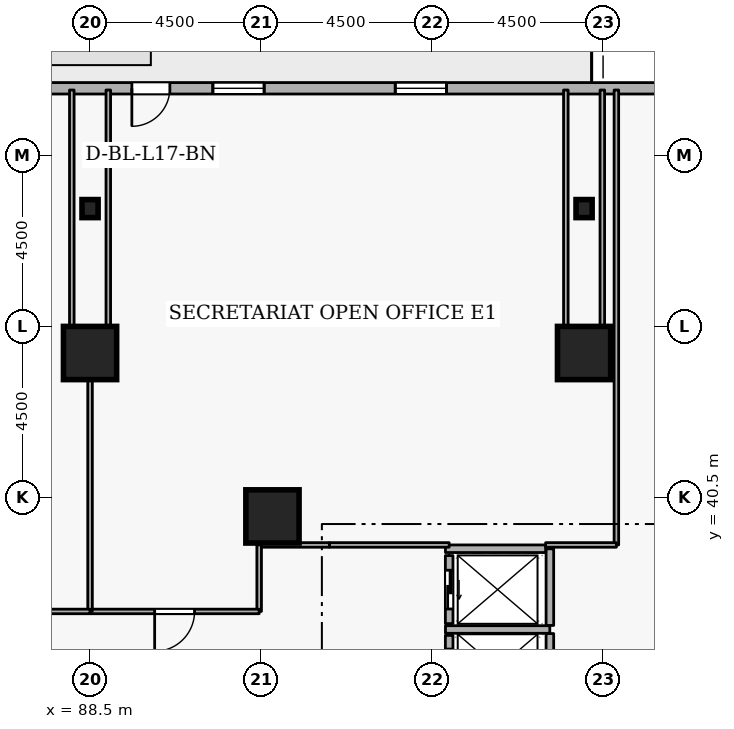
"""IFC4 building model, lengths in metres.
Left out: names, types, materials, properties, quantities, classifications, styles, units other than length and angle.
Written with IfcOpenShell. Run it as: python <this file> out.ifc"""

import sys

from ifc_helpers import new_model, si_unit, direction, frame, frame_2d, origin, origin_2d, place, context, subcontext, project, spatial, rectangle, i_section, extrude, element, fill, save


model = new_model("IFC4")
c1 = context("Model", 3, precision=1e-05, world=origin(), true_north=direction((0.0, 1.0)))
c2 = subcontext(c1, "Body", "Model", "MODEL_VIEW")
j1 = project(units=[si_unit("LENGTHUNIT", "METRE"), si_unit("PLANEANGLEUNIT", "RADIAN")], contexts=[c1])
p1 = place(None, origin())
s1 = spatial("IfcSite", under=j1, at=p1, CompositionType="ELEMENT")
p2 = place(p1, origin())
s2 = spatial("IfcBuilding", under=s1, at=p2, CompositionType="ELEMENT")
p3 = place(p2, frame((0.0, 0.0, 68.1)))
s3 = spatial("IfcBuildingStorey", under=s2, at=p3, CompositionType="ELEMENT", Elevation=68.1)
for number, where, z_axis, x_axis in (
    (1, (101.5, 44.3, 0.0), (0.0, 0.0, 1.0), (1.0, 0.0, 0.0)),
    (2, (88.5, 44.3, 0.0), (0.0, 0.0, 1.0), (1.0, 0.0, 0.0)),
    (3, (93.3, 40.0, 0.0), (0.0, 0.0, 1.0), (1.0, 0.0, 0.0)),
):
    element("IfcColumn", number, at=place(p3, frame(where, z_axis=z_axis, x_axis=x_axis)), inside=s3, PredefinedType="COLUMN", context=c2, shape_type="SweptSolid", body=[
        extrude(rectangle(XDim=1.4, YDim=1.4, at=origin_2d()), origin(), (0.0, 0.0, 1.0), 3.6),
    ])
for number, where, z_axis, x_axis in (
    (4, (101.5, 48.1, 0.0), (0.0, 0.0, 1.0), (1.0, 0.0, 0.0)),
    (5, (88.5, 48.1, 0.0), (0.0, 0.0, 1.0), (1.0, 0.0, 0.0)),
):
    element("IfcColumn", number, at=place(p3, frame(where, z_axis=z_axis, x_axis=x_axis)), inside=s3, PredefinedType="COLUMN", context=c2, shape_type="SweptSolid", body=[
        extrude(i_section(OverallWidth=0.424, OverallDepth=0.475, WebThickness=0.048, FlangeThickness=0.077, FilletRadius=0.015, at=origin_2d()), origin(), (0.0, 0.0, 1.0), 3.6),
    ])
p4 = place(p3, frame((110.181, 51.265, 0.0), z_axis=(0.0, 0.0, 1.0), x_axis=(-1.0, 0.0, 0.0)))
e6 = element("IfcWall", 6, at=p4, inside=s3, PredefinedType="STANDARD", context=c2, shape_type="SweptSolid", body=[
    extrude(rectangle(XDim=37.362, YDim=0.3, at=frame_2d((18.681, 0.0))), origin(), (0.0, 0.0, 1.0), 2.66),
])
p5 = place(p4, frame((19.581, 0.0, 0.0)))
e7 = element("IfcOpeningElement", 7, at=p5, cuts=e6, PredefinedType="OPENING", context=c2, shape_type="SweptSolid", body=[
    extrude(rectangle(XDim=1.0, YDim=2.08, at=frame_2d((0.5, 1.04))), frame((0.0, 0.16, 0.0), z_axis=(0.0, -1.0, 0.0), x_axis=(1.0, 0.0, 0.0)), (0.0, 0.0, 1.0), 0.32),
])
p6 = place(p4, frame((2.7, 0.0, 0.72)))
e8 = element("IfcOpeningElement", 8, at=p6, cuts=e6, PredefinedType="OPENING", context=c2, shape_type="SweptSolid", body=[
    extrude(rectangle(XDim=1.35, YDim=1.05, at=frame_2d((0.675, 0.525))), frame((0.0, 0.16, 0.0), z_axis=(0.0, -1.0, 0.0), x_axis=(1.0, 0.0, 0.0)), (0.0, 0.0, 1.0), 0.32),
])
p7 = place(p4, frame((12.3, 0.0, 0.72)))
e9 = element("IfcOpeningElement", 9, at=p7, cuts=e6, PredefinedType="OPENING", context=c2, shape_type="SweptSolid", body=[
    extrude(rectangle(XDim=1.35, YDim=1.05, at=frame_2d((0.675, 0.525))), frame((0.0, 0.16, 0.0), z_axis=(0.0, -1.0, 0.0), x_axis=(1.0, 0.0, 0.0)), (0.0, 0.0, 1.0), 0.32),
])
p8 = place(p4, frame((17.1, 0.0, 0.72)))
e10 = element("IfcOpeningElement", 10, at=p8, cuts=e6, PredefinedType="OPENING", context=c2, shape_type="SweptSolid", body=[
    extrude(rectangle(XDim=1.35, YDim=1.05, at=frame_2d((0.675, 0.525))), frame((0.0, 0.16, 0.0), z_axis=(0.0, -1.0, 0.0), x_axis=(1.0, 0.0, 0.0)), (0.0, 0.0, 1.0), 0.32),
])
p9 = place(p4, frame((26.7, 0.0, 0.72)))
e11 = element("IfcOpeningElement", 11, at=p9, cuts=e6, PredefinedType="OPENING", context=c2, shape_type="SweptSolid", body=[
    extrude(rectangle(XDim=1.35, YDim=1.05, at=frame_2d((0.675, 0.525))), frame((0.0, 0.16, 0.0), z_axis=(0.0, -1.0, 0.0), x_axis=(1.0, 0.0, 0.0)), (0.0, 0.0, 1.0), 0.32),
])
p10 = place(p4, frame((31.5, 0.0, 0.72)))
e12 = element("IfcOpeningElement", 12, at=p10, cuts=e6, PredefinedType="OPENING", context=c2, shape_type="SweptSolid", body=[
    extrude(rectangle(XDim=1.35, YDim=1.05, at=frame_2d((0.675, 0.525))), frame((0.0, 0.16, 0.0), z_axis=(0.0, -1.0, 0.0), x_axis=(1.0, 0.0, 0.0)), (0.0, 0.0, 1.0), 0.32),
])
p11 = place(p3, frame((97.95, 36.87, 0.0), z_axis=(0.0, 0.0, 1.0), x_axis=(0.0, -1.0, 0.0)))
e13 = element("IfcWall", 13, at=p11, inside=s3, PredefinedType="STANDARD", context=c2, shape_type="SweptSolid", body=[
    extrude(rectangle(XDim=1.74, YDim=0.2, at=frame_2d((0.87, 0.0))), origin(), (0.0, 0.0, 1.0), 3.26),
])
p12 = place(p11, frame((0.36, 0.0, 0.0)))
e14 = element("IfcOpeningElement", 14, at=p12, cuts=e13, PredefinedType="OPENING", context=c2, shape_type="SweptSolid", body=[
    extrude(rectangle(XDim=1.02, YDim=2.06, at=frame_2d((0.51, 1.03))), frame((0.0, 0.11, 0.0), z_axis=(0.0, -1.0, 0.0), x_axis=(1.0, 0.0, 0.0)), (0.0, 0.0, 1.0), 0.22),
])
p13 = place(p3, frame((97.95, 38.97, 0.0), z_axis=(0.0, 0.0, 1.0), x_axis=(0.0, -1.0, 0.0)))
e15 = element("IfcWall", 15, at=p13, inside=s3, PredefinedType="STANDARD", context=c2, shape_type="SweptSolid", body=[
    extrude(rectangle(XDim=1.79, YDim=0.2, at=frame_2d((0.895, 0.0))), origin(), (0.0, 0.0, 1.0), 3.26),
])
p14 = place(p13, frame((0.385, 0.0, 0.0)))
e16 = element("IfcOpeningElement", 16, at=p14, cuts=e15, PredefinedType="OPENING", context=c2, shape_type="SweptSolid", body=[
    extrude(rectangle(XDim=1.02, YDim=2.06, at=frame_2d((0.51, 1.03))), frame((0.0, 0.11, 0.0), z_axis=(0.0, -1.0, 0.0), x_axis=(1.0, 0.0, 0.0)), (0.0, 0.0, 1.0), 0.22),
])
p15 = place(p3, frame((97.852, 37.025, 0.0), z_axis=(0.0, 0.0, 1.0), x_axis=(1.0, 0.0, 0.0)))
e17 = element("IfcWall", 17, at=p15, inside=s3, PredefinedType="STANDARD", context=c2, shape_type="SweptSolid", body=[
    extrude(rectangle(XDim=2.746, YDim=0.2, at=frame_2d((1.373, 0.0))), origin(), (0.0, 0.0, 1.0), 3.26),
])
p16 = place(p3, frame((100.6, 35.062, 0.0), z_axis=(0.0, 0.0, 1.0), x_axis=(0.0, 1.0, 0.0)))
e18 = element("IfcWall", 18, at=p16, inside=s3, PredefinedType="STANDARD", context=c2, shape_type="SweptSolid", body=[
    extrude(rectangle(XDim=1.856, YDim=0.2, at=frame_2d((0.928, 0.0))), origin(), (0.0, 0.0, 1.0), 3.26),
])
p17 = place(p3, frame((100.6, 37.132, 0.0), z_axis=(0.0, 0.0, 1.0), x_axis=(0.0, 1.0, 0.0)))
e19 = element("IfcWall", 19, at=p17, inside=s3, PredefinedType="STANDARD", context=c2, shape_type="SweptSolid", body=[
    extrude(rectangle(XDim=2.016, YDim=0.2, at=frame_2d((1.008, 0.0))), origin(), (0.0, 0.0, 1.0), 3.26),
])
p18 = place(p3, frame((97.852, 39.15, 0.0), z_axis=(0.0, 0.0, 1.0), x_axis=(1.0, 0.0, 0.0)))
e20 = element("IfcWall", 20, at=p18, inside=s3, PredefinedType="STANDARD", context=c2, shape_type="SweptSolid", body=[
    extrude(rectangle(XDim=2.636, YDim=0.2, at=frame_2d((1.318, 0.0))), origin(), (0.0, 0.0, 1.0), 3.26),
])
p19 = place(p3, frame((97.95, 39.25, 0.0), z_axis=(0.0, 0.0, 1.0), x_axis=(-1.0, 0.0, 0.0)))
e21 = element("IfcWall", 21, at=p19, inside=s3, PredefinedType="PARTITIONING", context=c2, shape_type="SweptSolid", body=[
    extrude(rectangle(XDim=3.15, YDim=0.12, at=frame_2d((1.575, 0.0))), origin(), (0.0, 0.0, 1.0), 3.26),
])
p20 = place(p3, frame((94.8, 39.25, 0.0), z_axis=(0.0, 0.0, 1.0), x_axis=(-1.0, 0.0, 0.0)))
e22 = element("IfcWall", 22, at=p20, inside=s3, PredefinedType="PARTITIONING", context=c2, shape_type="SweptSolid", body=[
    extrude(rectangle(XDim=1.85, YDim=0.12, at=frame_2d((0.925, 0.0))), origin(), (0.0, 0.0, 1.0), 3.26),
])
p21 = place(p3, frame((92.95, 39.25, 0.0), z_axis=(0.0, 0.0, 1.0), x_axis=(0.0, -1.0, 0.0)))
e23 = element("IfcWall", 23, at=p21, inside=s3, PredefinedType="PARTITIONING", context=c2, shape_type="SweptSolid", body=[
    extrude(rectangle(XDim=1.75, YDim=0.12, at=frame_2d((0.875, 0.0))), origin(), (0.0, 0.0, 1.0), 3.26),
])
p22 = place(p3, frame((92.95, 37.5, 0.0), z_axis=(0.0, 0.0, 1.0), x_axis=(-1.0, 0.0, 0.0)))
e24 = element("IfcWall", 24, at=p22, inside=s3, PredefinedType="PARTITIONING", context=c2, shape_type="SweptSolid", body=[
    extrude(rectangle(XDim=4.45, YDim=0.12, at=frame_2d((2.225, 0.0))), origin(), (0.0, 0.0, 1.0), 3.26),
])
p23 = place(p22, frame((1.7, 0.0, 0.0)))
e25 = element("IfcOpeningElement", 25, at=p23, cuts=e24, PredefinedType="OPENING", context=c2, shape_type="SweptSolid", body=[
    extrude(rectangle(XDim=1.05, YDim=2.1, at=frame_2d((0.525, 1.05))), frame((0.0, 0.07, 0.0), z_axis=(0.0, -1.0, 0.0), x_axis=(1.0, 0.0, 0.0)), (0.0, 0.0, 1.0), 0.14),
])
p24 = place(p3, frame((88.5, 37.5, 0.0), z_axis=(0.0, 0.0, 1.0), x_axis=(0.0, 1.0, 0.0)))
e26 = element("IfcWall", 26, at=p24, inside=s3, PredefinedType="PARTITIONING", context=c2, shape_type="SweptSolid", body=[
    extrude(rectangle(XDim=6.8, YDim=0.12, at=frame_2d((3.4, 0.0))), origin(), (0.0, 0.0, 1.0), 2.798),
])
for number, where, z_axis, x_axis in (
    (27, (88.98, 44.3, 0.0), (0.0, 0.0, 1.0), (0.0, 1.0, 0.0)),
    (28, (101.02, 51.22, 0.0), (0.0, 0.0, 1.0), (0.0, -1.0, 0.0)),
    (29, (101.98, 44.3, 0.0), (0.0, 0.0, 1.0), (0.0, 1.0, 0.0)),
):
    element("IfcWall", number, at=place(p3, frame(where, z_axis=z_axis, x_axis=x_axis)), inside=s3, PredefinedType="PARTITIONING", context=c2, shape_type="SweptSolid", body=[
        extrude(rectangle(XDim=6.92, YDim=0.12, at=frame_2d((3.46, 0.0))), origin(), (0.0, 0.0, 1.0), 3.26),
    ])
p25 = place(p3, frame((102.35, 51.22, 0.0), z_axis=(0.0, 0.0, 1.0), x_axis=(0.0, -1.0, 0.0)))
e30 = element("IfcWall", 30, at=p25, inside=s3, PredefinedType="PARTITIONING", context=c2, shape_type="SweptSolid", body=[
    extrude(rectangle(XDim=11.97, YDim=0.12, at=frame_2d((5.985, 0.0))), origin(), (0.0, 0.0, 1.0), 3.26),
])
p26 = place(p3, frame((102.35, 39.25, 0.0), z_axis=(0.0, 0.0, 1.0), x_axis=(-1.0, 0.0, 0.0)))
e31 = element("IfcWall", 31, at=p26, inside=s3, PredefinedType="PARTITIONING", context=c2, shape_type="SweptSolid", body=[
    extrude(rectangle(XDim=1.862, YDim=0.12, at=frame_2d((0.931, 0.0))), origin(), (0.0, 0.0, 1.0), 3.26),
])
p27 = place(p3, frame((88.02, 51.22, 0.0), z_axis=(0.0, 0.0, 1.0), x_axis=(0.0, -1.0, 0.0)))
e32 = element("IfcWall", 32, at=p27, inside=s3, PredefinedType="PARTITIONING", context=c2, shape_type="SweptSolid", body=[
    extrude(rectangle(XDim=6.92, YDim=0.12, at=frame_2d((3.46, 0.0))), origin(), (0.0, 0.0, 1.0), 3.26),
])
p28 = place(p3, frame((88.5, 37.5, 0.0), z_axis=(0.0, 0.0, 1.0), x_axis=(-1.0, 0.0, 0.0)))
e33 = element("IfcWall", 33, at=p28, inside=s3, PredefinedType="PARTITIONING", context=c2, shape_type="SweptSolid", body=[
    extrude(rectangle(XDim=3.15, YDim=0.12, at=frame_2d((1.575, 0.0))), origin(), (0.0, 0.0, 1.0), 3.26),
])
p29 = place(p28, frame((1.1, 0.0, 0.0)))
e34 = element("IfcOpeningElement", 34, at=p29, cuts=e33, PredefinedType="OPENING", context=c2, shape_type="SweptSolid", body=[
    extrude(rectangle(XDim=0.95, YDim=2.1, at=frame_2d((0.475, 1.05))), frame((0.0, 0.07, 0.0), z_axis=(0.0, -1.0, 0.0), x_axis=(1.0, 0.0, 0.0)), (0.0, 0.0, 1.0), 0.14),
])
p30 = place(p5, origin())
e35 = element("IfcDoor", 35, at=p30, inside=s3, OperationType="SINGLE_SWING_RIGHT", PredefinedType="DOOR", context=c2, shape_type="SweptSolid", body=[
    extrude(rectangle(XDim=1.0, YDim=2.08, at=frame_2d((0.5, 1.04))), frame((0.0, 0.025, 0.0), z_axis=(0.0, -1.0, 0.0), x_axis=(1.0, 0.0, 0.0)), (0.0, 0.0, 1.0), 0.05),
])
fill(e7, e35)
p31 = place(p7, origin())
e36 = element("IfcWindow", 36, at=p31, inside=s3, PartitioningType="SINGLE_PANEL", PredefinedType="WINDOW", context=c2, shape_type="SweptSolid", body=[
    extrude(rectangle(XDim=1.35, YDim=1.05, at=frame_2d((0.675, 0.525))), frame((0.0, 0.03, 0.0), z_axis=(0.0, -1.0, 0.0), x_axis=(1.0, 0.0, 0.0)), (0.0, 0.0, 1.0), 0.06),
])
fill(e9, e36)
p32 = place(p8, origin())
e37 = element("IfcWindow", 37, at=p32, inside=s3, PartitioningType="SINGLE_PANEL", PredefinedType="WINDOW", context=c2, shape_type="SweptSolid", body=[
    extrude(rectangle(XDim=1.35, YDim=1.05, at=frame_2d((0.675, 0.525))), frame((0.0, 0.03, 0.0), z_axis=(0.0, -1.0, 0.0), x_axis=(1.0, 0.0, 0.0)), (0.0, 0.0, 1.0), 0.06),
])
fill(e10, e37)
p33 = place(p12, origin())
e38 = element("IfcDoor", 38, at=p33, inside=s3, OperationType="SLIDING_TO_LEFT", PredefinedType="DOOR", context=c2, shape_type="SweptSolid", body=[
    extrude(rectangle(XDim=1.02, YDim=2.06, at=frame_2d((0.51, 1.03))), frame((0.0, 0.025, 0.0), z_axis=(0.0, -1.0, 0.0), x_axis=(1.0, 0.0, 0.0)), (0.0, 0.0, 1.0), 0.05),
])
fill(e14, e38)
p34 = place(p14, origin())
e39 = element("IfcDoor", 39, at=p34, inside=s3, OperationType="SLIDING_TO_LEFT", PredefinedType="DOOR", context=c2, shape_type="SweptSolid", body=[
    extrude(rectangle(XDim=1.02, YDim=2.06, at=frame_2d((0.51, 1.03))), frame((0.0, 0.025, 0.0), z_axis=(0.0, -1.0, 0.0), x_axis=(1.0, 0.0, 0.0)), (0.0, 0.0, 1.0), 0.05),
])
fill(e16, e39)
p35 = place(p23, origin())
e40 = element("IfcDoor", 40, at=p35, inside=s3, OperationType="SINGLE_SWING_RIGHT", PredefinedType="DOOR", context=c2, shape_type="SweptSolid", body=[
    extrude(rectangle(XDim=1.05, YDim=2.1, at=frame_2d((0.525, 1.05))), frame((0.0, 0.025, 0.0), z_axis=(0.0, -1.0, 0.0), x_axis=(1.0, 0.0, 0.0)), (0.0, 0.0, 1.0), 0.05),
])
fill(e25, e40)
save(model, sys.argv[1])
